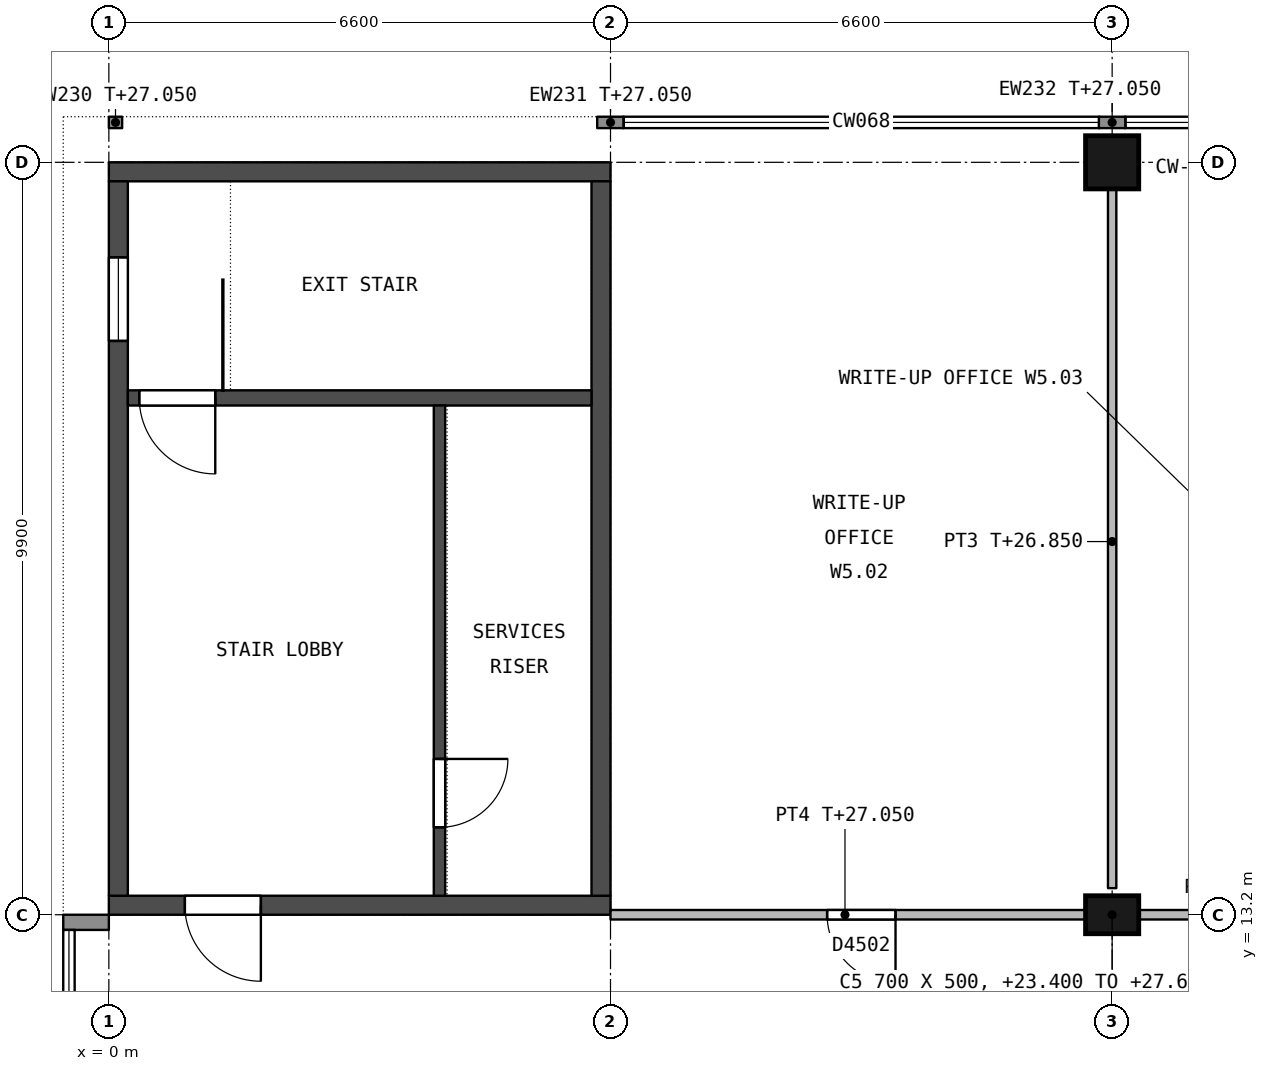
"""IFC4 building model, lengths in metres.
Left out: names, types, materials, properties, quantities, classifications, styles, units other than length and angle.
Written with IfcOpenShell. Run it as: python <this file> out.ifc"""

import sys

from ifc_helpers import new_model, si_unit, direction, frame, frame_2d, origin, origin_2d, place, context, subcontext, project, spatial, rectangle, extrude, element, fill, save


model = new_model("IFC4")
c1 = context("Model", 3, precision=1e-05, world=origin(), true_north=direction((0.0, 1.0)))
c2 = subcontext(c1, "Body", "Model", "MODEL_VIEW")
j1 = project(units=[si_unit("LENGTHUNIT", "METRE"), si_unit("PLANEANGLEUNIT", "RADIAN")], contexts=[c1])
p1 = place(None, origin())
s1 = spatial("IfcSite", under=j1, at=p1, CompositionType="ELEMENT")
p2 = place(p1, origin())
s2 = spatial("IfcBuilding", under=s1, at=p2, CompositionType="ELEMENT")
p3 = place(p2, frame((0.0, 0.0, 23.4)))
s3 = spatial("IfcBuildingStorey", under=s2, at=p3, CompositionType="ELEMENT", Elevation=23.4)
p4 = place(p3, frame((13.2, 13.2, 0.0), z_axis=(0.0, 0.0, 1.0), x_axis=(1.0, 0.0, 0.0)))
e1 = element("IfcColumn", 1, at=p4, inside=s3, PredefinedType="COLUMN", context=c2, shape_type="SweptSolid", body=[
    extrude(rectangle(XDim=0.7, YDim=0.5, at=origin_2d()), origin(), (0.0, 0.0, 1.0), 4.25),
])
p5 = place(p3, frame((13.2, 23.1, 0.0), z_axis=(0.0, 0.0, 1.0), x_axis=(1.0, 0.0, 0.0)))
e2 = element("IfcColumn", 2, at=p5, inside=s3, PredefinedType="COLUMN", context=c2, shape_type="SweptSolid", body=[
    extrude(rectangle(XDim=0.7, YDim=0.7, at=origin_2d()), origin(), (0.0, 0.0, 1.0), 4.25),
])
p6 = place(p3, frame((0.0, 13.325, 0.0), z_axis=(0.0, 0.0, 1.0), x_axis=(1.0, 0.0, 0.0)))
e3 = element("IfcWall", 3, at=p6, inside=s3, PredefinedType="SHEAR", context=c2, shape_type="SweptSolid", body=[
    extrude(rectangle(XDim=6.6, YDim=0.25, at=frame_2d((3.3, 0.0))), origin(), (0.0, 0.0, 1.0), 4.25),
])
p7 = place(p6, frame((1.0, 0.0, 0.0)))
e4 = element("IfcOpeningElement", 4, at=p7, cuts=e3, PredefinedType="OPENING", context=c2, shape_type="SweptSolid", body=[
    extrude(rectangle(XDim=1.0, YDim=2.1, at=frame_2d((0.5, 1.05))), frame((0.0, 0.135, 0.0), z_axis=(0.0, -1.0, 0.0), x_axis=(1.0, 0.0, 0.0)), (0.0, 0.0, 1.0), 0.27),
])
p8 = place(p3, frame((0.0, 22.975, 0.0), z_axis=(0.0, 0.0, 1.0), x_axis=(1.0, 0.0, 0.0)))
e5 = element("IfcWall", 5, at=p8, inside=s3, PredefinedType="SHEAR", context=c2, shape_type="SweptSolid", body=[
    extrude(rectangle(XDim=6.6, YDim=0.25, at=frame_2d((3.3, 0.0))), origin(), (0.0, 0.0, 1.0), 4.25),
])
p9 = place(p3, frame((0.125, 13.45, 0.0), z_axis=(0.0, 0.0, 1.0), x_axis=(0.0, 1.0, 0.0)))
e6 = element("IfcWall", 6, at=p9, inside=s3, PredefinedType="SHEAR", context=c2, shape_type="SweptSolid", body=[
    extrude(rectangle(XDim=9.4, YDim=0.25, at=frame_2d((4.7, 0.0))), origin(), (0.0, 0.0, 1.0), 4.25),
])
p10 = place(p9, frame((7.3, 0.0, 0.7)))
e7 = element("IfcOpeningElement", 7, at=p10, cuts=e6, PredefinedType="OPENING", context=c2, shape_type="SweptSolid", body=[
    extrude(rectangle(XDim=1.1, YDim=1.5, at=frame_2d((0.55, 0.75))), frame((0.0, 0.135, 0.0), z_axis=(0.0, -1.0, 0.0), x_axis=(1.0, 0.0, 0.0)), (0.0, 0.0, 1.0), 0.27),
])
p11 = place(p3, frame((6.475, 13.45, 0.0), z_axis=(0.0, 0.0, 1.0), x_axis=(0.0, 1.0, 0.0)))
e8 = element("IfcWall", 8, at=p11, inside=s3, PredefinedType="SHEAR", context=c2, shape_type="SweptSolid", body=[
    extrude(rectangle(XDim=9.4, YDim=0.25, at=frame_2d((4.7, 0.0))), origin(), (0.0, 0.0, 1.0), 4.25),
])
p12 = place(p3, frame((0.25, 20.0, 0.0), z_axis=(0.0, 0.0, 1.0), x_axis=(1.0, 0.0, 0.0)))
e9 = element("IfcWall", 9, at=p12, inside=s3, PredefinedType="SHEAR", context=c2, shape_type="SweptSolid", body=[
    extrude(rectangle(XDim=6.1, YDim=0.2, at=frame_2d((3.05, 0.0))), origin(), (0.0, 0.0, 1.0), 4.25),
])
p13 = place(p12, frame((0.15, 0.0, 0.0)))
e10 = element("IfcOpeningElement", 10, at=p13, cuts=e9, PredefinedType="OPENING", context=c2, shape_type="SweptSolid", body=[
    extrude(rectangle(XDim=1.0, YDim=2.1, at=frame_2d((0.5, 1.05))), frame((0.0, 0.11, 0.0), z_axis=(0.0, -1.0, 0.0), x_axis=(1.0, 0.0, 0.0)), (0.0, 0.0, 1.0), 0.22),
])
p14 = place(p3, frame((4.35, 13.45, 0.0), z_axis=(0.0, 0.0, 1.0), x_axis=(0.0, 1.0, 0.0)))
e11 = element("IfcWall", 11, at=p14, inside=s3, PredefinedType="SHEAR", context=c2, shape_type="SweptSolid", body=[
    extrude(rectangle(XDim=6.45, YDim=0.15, at=frame_2d((3.225, 0.0))), origin(), (0.0, 0.0, 1.0), 4.25),
])
p15 = place(p14, frame((0.9, 0.0, 0.0)))
e12 = element("IfcOpeningElement", 12, at=p15, cuts=e11, PredefinedType="OPENING", context=c2, shape_type="SweptSolid", body=[
    extrude(rectangle(XDim=0.9, YDim=2.1, at=frame_2d((0.45, 1.05))), frame((0.0, 0.085, 0.0), z_axis=(0.0, -1.0, 0.0), x_axis=(1.0, 0.0, 0.0)), (0.0, 0.0, 1.0), 0.17),
])
p16 = place(p3, frame((0.0, 23.625, 0.0), z_axis=(0.0, 0.0, 1.0), x_axis=(1.0, 0.0, 0.0)))
e13 = element("IfcWall", 13, at=p16, inside=s3, PredefinedType="STANDARD", context=c2, shape_type="SweptSolid", body=[
    extrude(rectangle(XDim=0.175, YDim=0.15, at=frame_2d((0.087, 0.0))), origin(), (0.0, 0.0, 1.0), 3.65),
])
p17 = place(p3, frame((6.425, 23.625, 0.0), z_axis=(0.0, 0.0, 1.0), x_axis=(1.0, 0.0, 0.0)))
e14 = element("IfcWall", 14, at=p17, inside=s3, PredefinedType="STANDARD", context=c2, shape_type="SweptSolid", body=[
    extrude(rectangle(XDim=0.35, YDim=0.15, at=frame_2d((0.175, 0.0))), origin(), (0.0, 0.0, 1.0), 3.65),
])
p18 = place(p3, frame((13.025, 23.625, 0.0), z_axis=(0.0, 0.0, 1.0), x_axis=(1.0, 0.0, 0.0)))
e15 = element("IfcWall", 15, at=p18, inside=s3, PredefinedType="STANDARD", context=c2, shape_type="SweptSolid", body=[
    extrude(rectangle(XDim=0.35, YDim=0.15, at=frame_2d((0.175, 0.0))), origin(), (0.0, 0.0, 1.0), 3.65),
])
p19 = place(p3, frame((0.0, 13.1, 0.0), z_axis=(0.0, 0.0, 1.0), x_axis=(-1.0, 0.0, 0.0)))
e16 = element("IfcWall", 16, at=p19, inside=s3, PredefinedType="STANDARD", context=c2, shape_type="SweptSolid", body=[
    extrude(rectangle(XDim=0.6, YDim=0.2, at=frame_2d((0.3, 0.0))), origin(), (0.0, 0.0, 1.0), 3.65),
])
p20 = place(p3, frame((6.6, 13.2, 0.0), z_axis=(0.0, 0.0, 1.0), x_axis=(1.0, 0.0, 0.0)))
e17 = element("IfcWall", 17, at=p20, inside=s3, PredefinedType="PARTITIONING", context=c2, shape_type="SweptSolid", body=[
    extrude(rectangle(XDim=6.25, YDim=0.125, at=frame_2d((3.125, 0.0))), origin(), (0.0, 0.0, 1.0), 3.65),
])
p21 = place(p20, frame((2.85, 0.0, 0.0)))
e18 = element("IfcOpeningElement", 18, at=p21, cuts=e17, PredefinedType="OPENING", context=c2, shape_type="SweptSolid", body=[
    extrude(rectangle(XDim=0.9, YDim=2.1, at=frame_2d((0.45, 1.05))), frame((0.0, 0.073, 0.0), z_axis=(0.0, -1.0, 0.0), x_axis=(1.0, 0.0, 0.0)), (0.0, 0.0, 1.0), 0.145),
])
p22 = place(p3, frame((16.5, 13.2, 0.0), z_axis=(0.0, 0.0, 1.0), x_axis=(-1.0, 0.0, 0.0)))
e19 = element("IfcWall", 19, at=p22, inside=s3, PredefinedType="PARTITIONING", context=c2, shape_type="SweptSolid", body=[
    extrude(rectangle(XDim=2.95, YDim=0.125, at=frame_2d((1.475, 0.0))), origin(), (0.0, 0.0, 1.0), 3.65),
])
p23 = place(p3, frame((13.2, 13.55, 0.0), z_axis=(0.0, 0.0, 1.0), x_axis=(0.0, 1.0, 0.0)))
e20 = element("IfcWall", 20, at=p23, inside=s3, PredefinedType="PARTITIONING", context=c2, shape_type="SweptSolid", body=[
    extrude(rectangle(XDim=9.2, YDim=0.11, at=frame_2d((4.6, 0.0))), origin(), (0.0, 0.0, 1.0), 3.45),
])
p24 = place(p15, origin())
e21 = element("IfcDoor", 21, at=p24, inside=s3, OperationType="SINGLE_SWING_RIGHT", PredefinedType="DOOR", context=c2, shape_type="SweptSolid", body=[
    extrude(rectangle(XDim=0.9, YDim=2.1, at=frame_2d((0.45, 1.05))), frame((0.0, 0.025, 0.0), z_axis=(0.0, -1.0, 0.0), x_axis=(1.0, 0.0, 0.0)), (0.0, 0.0, 1.0), 0.05),
])
fill(e12, e21)
p25 = place(p7, origin())
e22 = element("IfcDoor", 22, at=p25, inside=s3, OperationType="SINGLE_SWING_RIGHT", PredefinedType="DOOR", context=c2, shape_type="SweptSolid", body=[
    extrude(rectangle(XDim=1.0, YDim=2.1, at=frame_2d((0.5, 1.05))), frame((0.0, 0.025, 0.0), z_axis=(0.0, -1.0, 0.0), x_axis=(1.0, 0.0, 0.0)), (0.0, 0.0, 1.0), 0.05),
])
fill(e4, e22)
p26 = place(p13, origin())
e23 = element("IfcDoor", 23, at=p26, inside=s3, OperationType="SINGLE_SWING_RIGHT", PredefinedType="DOOR", context=c2, shape_type="SweptSolid", body=[
    extrude(rectangle(XDim=1.0, YDim=2.1, at=frame_2d((0.5, 1.05))), frame((0.0, 0.025, 0.0), z_axis=(0.0, -1.0, 0.0), x_axis=(1.0, 0.0, 0.0)), (0.0, 0.0, 1.0), 0.05),
])
fill(e10, e23)
p27 = place(p10, origin())
e24 = element("IfcWindow", 24, at=p27, inside=s3, PartitioningType="SINGLE_PANEL", PredefinedType="WINDOW", context=c2, shape_type="SweptSolid", body=[
    extrude(rectangle(XDim=1.1, YDim=1.5, at=frame_2d((0.55, 0.75))), frame((0.0, 0.03, 0.0), z_axis=(0.0, -1.0, 0.0), x_axis=(1.0, 0.0, 0.0)), (0.0, 0.0, 1.0), 0.06),
])
fill(e7, e24)
p28 = place(p21, origin())
e25 = element("IfcDoor", 25, at=p28, inside=s3, OperationType="SINGLE_SWING_RIGHT", PredefinedType="DOOR", context=c2, shape_type="SweptSolid", body=[
    extrude(rectangle(XDim=0.9, YDim=2.1, at=frame_2d((0.45, 1.05))), frame((0.0, 0.027, 0.0), z_axis=(0.0, -1.0, 0.0), x_axis=(1.0, 0.0, 0.0)), (0.0, 0.0, 1.0), 0.054),
])
fill(e18, e25)
save(model, sys.argv[1])
